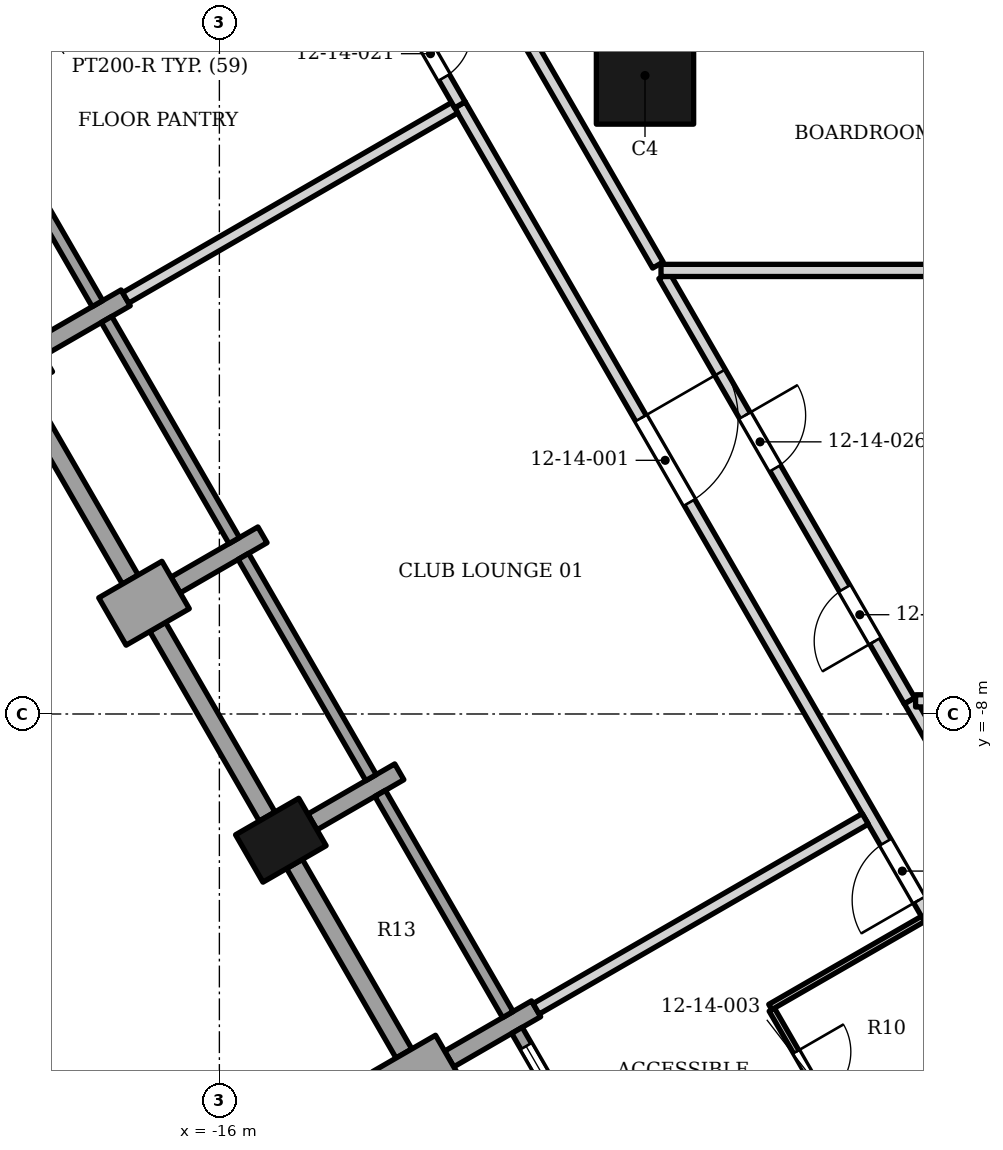
"""IFC4 building model, lengths in metres.
Left out: names, types, materials, properties, quantities, classifications, styles, units other than length and angle.
Written with IfcOpenShell. Run it as: python <this file> out.ifc"""

import sys

from ifc_helpers import new_model, si_unit, direction, frame, frame_2d, origin, origin_2d, place, context, subcontext, project, spatial, rectangle, extrude, element, fill, save


model = new_model("IFC4")
c1 = context("Model", 3, precision=1e-05, world=origin(), true_north=direction((0.0, 1.0)))
c2 = subcontext(c1, "Body", "Model", "MODEL_VIEW")
j1 = project(units=[si_unit("LENGTHUNIT", "METRE"), si_unit("PLANEANGLEUNIT", "RADIAN")], contexts=[c1])
p1 = place(None, origin())
s1 = spatial("IfcSite", under=j1, at=p1, CompositionType="ELEMENT")
p2 = place(p1, origin())
s2 = spatial("IfcBuilding", under=s1, at=p2, CompositionType="ELEMENT")
p3 = place(p2, frame((0.0, 0.0, 66.4)))
s3 = spatial("IfcBuildingStorey", under=s2, at=p3, CompositionType="ELEMENT", Elevation=66.4)
p4 = place(p3, frame((-9.0, 2.5, 0.0), z_axis=(0.0, 0.0, 1.0), x_axis=(1.0, 0.0, 0.0)))
e1 = element("IfcColumn", 1, at=p4, inside=s3, PredefinedType="COLUMN", context=c2, shape_type="SweptSolid", body=[
    extrude(rectangle(XDim=1.6, YDim=1.6, at=origin_2d()), origin(), (0.0, 0.0, 1.0), 3.4),
])
for number, where, z_axis, x_axis in (
    (2, (-19.489, -2.282, 0.0), (0.0, 0.0, 1.0), (0.5, -0.866, 0.0)),
    (3, (-14.989, -10.076, 0.0), (0.0, 0.0, 1.0), (0.5, -0.866, 0.0)),
):
    element("IfcColumn", number, at=place(p3, frame(where, z_axis=z_axis, x_axis=x_axis)), inside=s3, PredefinedType="COLUMN", context=c2, shape_type="SweptSolid", body=[
        extrude(rectangle(XDim=0.9, YDim=1.2, at=origin_2d()), origin(), (0.0, 0.0, 1.0), 3.4),
    ])
p5 = place(p3, frame((-17.541, -1.157, 0.0), z_axis=(0.0, 0.0, 1.0), x_axis=(-0.866104278045, -0.499863360881, 0.0)))
e4 = element("IfcWall", 4, at=p5, inside=s3, PredefinedType="SOLIDWALL", context=c2, shape_type="SweptSolid", body=[
    extrude(rectangle(XDim=1.65, YDim=0.3, at=frame_2d((0.825, 0.0))), origin(), (0.0, 0.0, 1.0), 2.65),
])
p6 = place(p3, frame((-17.759, -6.479, 0.0), z_axis=(0.0, 0.0, 1.0), x_axis=(0.866006032174, 0.500033551112, 0.0)))
e5 = element("IfcWall", 5, at=p6, inside=s3, PredefinedType="SOLIDWALL", context=c2, shape_type="SweptSolid", body=[
    extrude(rectangle(XDim=1.2, YDim=0.9, at=frame_2d((0.6, 0.0))), origin(), (0.0, 0.0, 1.0), 2.63),
])
p7 = place(p3, frame((-15.291, -5.054, 0.0), z_axis=(0.0, 0.0, 1.0), x_axis=(-0.866040211805, -0.499974350878, 0.0)))
e6 = element("IfcWall", 6, at=p7, inside=s3, PredefinedType="SOLIDWALL", context=c2, shape_type="SweptSolid", body=[
    extrude(rectangle(XDim=1.65, YDim=0.3, at=frame_2d((0.825, 0.0))), origin(), (0.0, 0.0, 1.0), 2.65),
])
p8 = place(p3, frame((-14.469, -9.776, 0.0), z_axis=(0.0, 0.0, 1.0), x_axis=(0.866067297121, 0.499927431592, 0.0)))
e7 = element("IfcWall", 7, at=p8, inside=s3, PredefinedType="SOLIDWALL", context=c2, shape_type="SweptSolid", body=[
    extrude(rectangle(XDim=1.65, YDim=0.3, at=frame_2d((0.825, 0.0))), origin(), (0.0, 0.0, 1.0), 2.384),
])
p9 = place(p3, frame((-13.259, -14.273, 0.0), z_axis=(0.0, 0.0, 1.0), x_axis=(0.866006032174, 0.500033551112, 0.0)))
e8 = element("IfcWall", 8, at=p9, inside=s3, PredefinedType="SOLIDWALL", context=c2, shape_type="SweptSolid", body=[
    extrude(rectangle(XDim=1.2, YDim=0.9, at=frame_2d((0.6, 0.0))), origin(), (0.0, 0.0, 1.0), 2.63),
])
p10 = place(p3, frame((-12.22, -13.673, 0.0), z_axis=(0.0, 0.0, 1.0), x_axis=(0.866040211805, 0.499974350878, 0.0)))
e9 = element("IfcWall", 9, at=p10, inside=s3, PredefinedType="SOLIDWALL", context=c2, shape_type="SweptSolid", body=[
    extrude(rectangle(XDim=1.65, YDim=0.3, at=frame_2d((0.825, 0.0))), origin(), (0.0, 0.0, 1.0), 2.65),
])
p11 = place(p3, frame((-20.105, 2.385, 0.0), z_axis=(0.0, 0.0, 1.0), x_axis=(0.49998411664, -0.866034573852, 0.0)))
e10 = element("IfcWall", 10, at=p11, inside=s3, PredefinedType="ELEMENTEDWALL", context=c2, shape_type="SweptSolid", body=[
    extrude(rectangle(XDim=4.2, YDim=0.2, at=frame_2d((2.1, 0.0))), origin(), (0.0, 0.0, 1.0), 2.65),
])
p12 = place(p3, frame((-17.464, -5.789, 0.0), z_axis=(0.0, 0.0, 1.0), x_axis=(-0.50001992892, 0.866013897511, 0.0)))
e11 = element("IfcWall", 11, at=p12, inside=s3, PredefinedType="SOLIDWALL", context=c2, shape_type="SweptSolid", body=[
    extrude(rectangle(XDim=3.599, YDim=0.3, at=frame_2d((1.8, 0.0))), origin(), (0.0, 0.0, 1.0), 2.63),
])
p13 = place(p3, frame((-17.855, -1.511, 0.0), z_axis=(0.0, 0.0, 1.0), x_axis=(0.499958946799, -0.866049104564, 0.0)))
e12 = element("IfcWall", 12, at=p13, inside=s3, PredefinedType="ELEMENTEDWALL", context=c2, shape_type="SweptSolid", body=[
    extrude(rectangle(XDim=4.2, YDim=0.2, at=frame_2d((2.1, 0.0))), origin(), (0.0, 0.0, 1.0), 2.65),
])
p14 = place(p3, frame((-17.014, -6.568, 0.0), z_axis=(0.0, 0.0, 1.0), x_axis=(0.500012057535, -0.866018442252, 0.0)))
e13 = element("IfcWall", 13, at=p14, inside=s3, PredefinedType="SOLIDWALL", context=c2, shape_type="SweptSolid", body=[
    extrude(rectangle(XDim=3.6, YDim=0.3, at=frame_2d((1.8, 0.0))), origin(), (0.0, 0.0, 1.0), 2.63),
])
p15 = place(p3, frame((-15.605, -5.409, 0.0), z_axis=(0.0, 0.0, 1.0), x_axis=(0.49998411664, -0.866034573852, 0.0)))
e14 = element("IfcWall", 14, at=p15, inside=s3, PredefinedType="ELEMENTEDWALL", context=c2, shape_type="SweptSolid", body=[
    extrude(rectangle(XDim=4.2, YDim=0.2, at=frame_2d((2.1, 0.0))), origin(), (0.0, 0.0, 1.0), 2.384),
])
p16 = place(p3, frame((-12.964, -13.583, 0.0), z_axis=(0.0, 0.0, 1.0), x_axis=(-0.499990559667, 0.866030854095, 0.0)))
e15 = element("IfcWall", 15, at=p16, inside=s3, PredefinedType="SOLIDWALL", context=c2, shape_type="SweptSolid", body=[
    extrude(rectangle(XDim=3.6, YDim=0.3, at=frame_2d((1.8, 0.0))), origin(), (0.0, 0.0, 1.0), 2.374),
])
p17 = place(p3, frame((-13.355, -9.306, 0.0), z_axis=(0.0, 0.0, 1.0), x_axis=(0.499958946799, -0.866049104564, 0.0)))
e16 = element("IfcWall", 16, at=p17, inside=s3, PredefinedType="ELEMENTEDWALL", context=c2, shape_type="SweptSolid", body=[
    extrude(rectangle(XDim=4.2, YDim=0.2, at=frame_2d((2.1, 0.0))), origin(), (0.0, 0.0, 1.0), 2.374),
])
p18 = place(p3, frame((-11.105, -13.203, 0.0), z_axis=(0.0, 0.0, 1.0), x_axis=(0.49998411664, -0.866034573852, 0.0)))
e17 = element("IfcWall", 17, at=p18, inside=s3, PredefinedType="ELEMENTEDWALL", context=c2, shape_type="SweptSolid", body=[
    extrude(rectangle(XDim=4.2, YDim=0.2, at=frame_2d((2.1, 0.0))), origin(), (0.0, 0.0, 1.0), 2.65),
])
p19 = place(p18, frame((0.3, 0.0, 0.6)))
e18 = element("IfcOpeningElement", 18, at=p19, cuts=e17, PredefinedType="OPENING", context=c2, shape_type="SweptSolid", body=[
    extrude(rectangle(XDim=2.1, YDim=1.8, at=frame_2d((1.05, 0.9))), frame((0.0, 0.11, 0.0), z_axis=(0.0, -1.0, 0.0), x_axis=(1.0, 0.0, 0.0)), (0.0, 0.0, 1.0), 0.22),
])
p20 = place(p18, frame((2.7, 0.0, 0.0)))
e19 = element("IfcOpeningElement", 19, at=p20, cuts=e17, PredefinedType="OPENING", context=c2, shape_type="SweptSolid", body=[
    extrude(rectangle(XDim=1.2, YDim=2.4, at=frame_2d((0.6, 1.2))), frame((0.0, 0.11, 0.0), z_axis=(0.0, -1.0, 0.0), x_axis=(1.0, 0.0, 0.0)), (0.0, 0.0, 1.0), 0.22),
])
p21 = place(p3, frame((-4.687, -14.52, 0.0), z_axis=(0.0, 0.0, 1.0), x_axis=(0.866533485277, 0.499118942632, 0.0)))
e20 = element("IfcWall", 20, at=p21, inside=s3, PredefinedType="PARTITIONING", context=c2, shape_type="SweptSolid", body=[
    extrude(rectangle(XDim=1.798, YDim=0.2, at=frame_2d((0.899, 0.0))), origin(), (0.0, 0.0, 1.0), 2.552),
])
p22 = place(p3, frame((-12.043, 2.017, 0.0), z_axis=(0.0, 0.0, 1.0), x_axis=(0.5000018851, -0.866024315419, 0.0)))
e21 = element("IfcWall", 21, at=p22, inside=s3, PredefinedType="PARTITIONING", context=c2, shape_type="SweptSolid", body=[
    extrude(rectangle(XDim=18.0, YDim=0.2, at=frame_2d((9.0, 0.0))), origin(), (0.0, 0.0, 1.0), 2.374),
])
p23 = place(p22, frame((5.95, 0.0, 0.0)))
e22 = element("IfcOpeningElement", 22, at=p23, cuts=e21, PredefinedType="OPENING", context=c2, shape_type="SweptSolid", body=[
    extrude(rectangle(XDim=1.6, YDim=2.1, at=frame_2d((0.8, 1.05))), frame((0.0, 0.11, 0.0), z_axis=(0.0, -1.0, 0.0), x_axis=(1.0, 0.0, 0.0)), (0.0, 0.0, 1.0), 0.22),
])
p24 = place(p22, frame((14.0, 0.0, 0.0)))
e23 = element("IfcOpeningElement", 23, at=p24, cuts=e21, PredefinedType="OPENING", context=c2, shape_type="SweptSolid", body=[
    extrude(rectangle(XDim=1.1, YDim=2.1, at=frame_2d((0.55, 1.05))), frame((0.0, 0.11, 0.0), z_axis=(0.0, -1.0, 0.0), x_axis=(1.0, 0.0, 0.0)), (0.0, 0.0, 1.0), 0.22),
])
p25 = place(p3, frame((-6.915, -12.862, 0.0), z_axis=(0.0, 0.0, 1.0), x_axis=(0.500062241894, -0.865989465428, 0.0)))
e24 = element("IfcWall", 24, at=p25, inside=s3, PredefinedType="PARTITIONING", context=c2, shape_type="SweptSolid", body=[
    extrude(rectangle(XDim=2.55, YDim=0.1, at=frame_2d((1.275, 0.0))), origin(), (0.0, 0.0, 1.0), 3.23),
])
p26 = place(p25, frame((0.8, 0.0, 0.0)))
e25 = element("IfcOpeningElement", 25, at=p26, cuts=e24, PredefinedType="OPENING", context=c2, shape_type="SweptSolid", body=[
    extrude(rectangle(XDim=0.9, YDim=2.1, at=frame_2d((0.45, 1.05))), frame((0.0, 0.06, 0.0), z_axis=(0.0, -1.0, 0.0), x_axis=(1.0, 0.0, 0.0)), (0.0, 0.0, 1.0), 0.12),
])
p27 = place(p3, frame((-6.94, -12.818, 0.0), z_axis=(0.0, 0.0, 1.0), x_axis=(0.866314505181, 0.49949892704, 0.0)))
e26 = element("IfcWall", 26, at=p27, inside=s3, PredefinedType="PARTITIONING", context=c2, shape_type="SweptSolid", body=[
    extrude(rectangle(XDim=2.9, YDim=0.1, at=frame_2d((1.45, 0.0))), origin(), (0.0, 0.0, 1.0), 2.374),
])
p28 = place(p3, frame((-10.791, -12.848, 0.0), z_axis=(0.0, 0.0, 1.0), x_axis=(0.866170627668, 0.499748380452, 0.0)))
e27 = element("IfcWall", 27, at=p28, inside=s3, PredefinedType="PARTITIONING", context=c2, shape_type="SweptSolid", body=[
    extrude(rectangle(XDim=6.25, YDim=0.2, at=frame_2d((3.125, 0.0))), origin(), (0.0, 0.0, 1.0), 2.374),
])
p29 = place(p3, frame((-4.649, -7.782, 0.0), z_axis=(0.0, 0.0, 1.0), x_axis=(0.500018878653, -0.866014503915, 0.0)))
e28 = element("IfcWall", 28, at=p29, inside=s3, PredefinedType="PARTITIONING", context=c2, shape_type="SweptSolid", body=[
    extrude(rectangle(XDim=9.34, YDim=0.2, at=frame_2d((4.67, 0.0))), origin(), (0.0, 0.0, 1.0), 2.374),
])
p30 = place(p29, frame((2.488, 0.0, 0.0)))
e29 = element("IfcOpeningElement", 29, at=p30, cuts=e28, PredefinedType="OPENING", context=c2, shape_type="SweptSolid", body=[
    extrude(rectangle(XDim=1.0, YDim=2.1, at=frame_2d((0.5, 1.05))), frame((0.0, 0.11, 0.0), z_axis=(0.0, -1.0, 0.0), x_axis=(1.0, 0.0, 0.0)), (0.0, 0.0, 1.0), 0.22),
])
p31 = place(p3, frame((-4.55, -7.784, 0.0), z_axis=(0.0, 0.0, 1.0), x_axis=(1.0, 0.0, 0.0)))
e30 = element("IfcWall", 30, at=p31, inside=s3, PredefinedType="PARTITIONING", context=c2, shape_type="SweptSolid", body=[
    extrude(rectangle(XDim=9.138, YDim=0.2, at=frame_2d((4.569, 0.0))), origin(), (0.0, 0.0, 1.0), 2.384),
])
p32 = place(p3, frame((-17.541, -1.156, 0.0), z_axis=(0.0, 0.0, 1.0), x_axis=(0.865906436394, 0.500206000974, 0.0)))
e31 = element("IfcWall", 31, at=p32, inside=s3, PredefinedType="PARTITIONING", context=c2, shape_type="SweptSolid", body=[
    extrude(rectangle(XDim=6.249, YDim=0.2, at=frame_2d((3.125, 0.0))), origin(), (0.0, 0.0, 1.0), 2.384),
])
p33 = place(p3, frame((-8.686, -0.79, 0.0), z_axis=(0.0, 0.0, 1.0), x_axis=(0.499814962183, -0.866132209064, 0.0)))
e32 = element("IfcWall", 32, at=p33, inside=s3, PredefinedType="PARTITIONING", context=c2, shape_type="SweptSolid", body=[
    extrude(rectangle(XDim=8.072, YDim=0.2, at=frame_2d((4.036, 0.0))), origin(), (0.0, 0.0, 1.0), 2.384),
])
p34 = place(p33, frame((5.939, 0.0, 0.0)))
e33 = element("IfcOpeningElement", 33, at=p34, cuts=e32, PredefinedType="OPENING", context=c2, shape_type="SweptSolid", body=[
    extrude(rectangle(XDim=1.0, YDim=2.1, at=frame_2d((0.5, 1.05))), frame((0.0, 0.11, 0.0), z_axis=(0.0, -1.0, 0.0), x_axis=(1.0, 0.0, 0.0)), (0.0, 0.0, 1.0), 0.22),
])
p35 = place(p33, frame((2.657, 0.0, 0.0)))
e34 = element("IfcOpeningElement", 34, at=p35, cuts=e32, PredefinedType="OPENING", context=c2, shape_type="SweptSolid", body=[
    extrude(rectangle(XDim=1.0, YDim=2.1, at=frame_2d((0.5, 1.05))), frame((0.0, 0.11, 0.0), z_axis=(0.0, -1.0, 0.0), x_axis=(1.0, 0.0, 0.0)), (0.0, 0.0, 1.0), 0.22),
])
p36 = place(p3, frame((-8.737, -0.706, 0.0), z_axis=(0.0, 0.0, 1.0), x_axis=(1.0, 0.0, 0.0)))
e35 = element("IfcWall", 35, at=p36, inside=s3, PredefinedType="PARTITIONING", context=c2, shape_type="SweptSolid", body=[
    extrude(rectangle(XDim=17.512, YDim=0.2, at=frame_2d((8.756, 0.0))), origin(), (0.0, 0.0, 1.0), 2.384),
])
p37 = place(p3, frame((-13.013, 3.699, 0.0), z_axis=(0.0, 0.0, 1.0), x_axis=(0.499265012286, -0.866449333491, 0.0)))
e36 = element("IfcWall", 36, at=p37, inside=s3, PredefinedType="PARTITIONING", context=c2, shape_type="SweptSolid", body=[
    extrude(rectangle(XDim=1.941, YDim=0.2, at=frame_2d((0.97, 0.0))), origin(), (0.0, 0.0, 1.0), 3.23),
])
p38 = place(p37, frame((0.521, 0.0, 0.0)))
e37 = element("IfcOpeningElement", 37, at=p38, cuts=e36, PredefinedType="OPENING", context=c2, shape_type="SweptSolid", body=[
    extrude(rectangle(XDim=0.9, YDim=2.1, at=frame_2d((0.45, 1.05))), frame((0.0, 0.11, 0.0), z_axis=(0.0, -1.0, 0.0), x_axis=(1.0, 0.0, 0.0)), (0.0, 0.0, 1.0), 0.22),
])
p39 = place(p3, frame((-11.23, 3.613, 0.0), z_axis=(0.0, 0.0, 1.0), x_axis=(0.49997195544, -0.866041594713, 0.0)))
e38 = element("IfcWall", 38, at=p39, inside=s3, PredefinedType="PARTITIONING", context=c2, shape_type="SweptSolid", body=[
    extrude(rectangle(XDim=4.885, YDim=0.2, at=frame_2d((2.442, 0.0))), origin(), (0.0, 0.0, 1.0), 2.552),
])
p40 = place(p3, frame((-19.791, 2.74, 0.0), z_axis=(0.0, 0.0, 1.0), x_axis=(0.86605932655, 0.499941239442, 0.0)))
e39 = element("IfcWall", 39, at=p40, inside=s3, PredefinedType="PARTITIONING", context=c2, shape_type="SweptSolid", body=[
    extrude(rectangle(XDim=2.479, YDim=0.2, at=frame_2d((1.24, 0.0))), origin(), (0.0, 0.0, 1.0), 2.702),
])
p41 = place(p19, origin())
e40 = element("IfcWindow", 40, at=p41, inside=s3, PartitioningType="SINGLE_PANEL", PredefinedType="WINDOW", context=c2, shape_type="SweptSolid", body=[
    extrude(rectangle(XDim=2.1, YDim=1.8, at=frame_2d((1.05, 0.9))), frame((0.0, 0.03, 0.0), z_axis=(0.0, -1.0, 0.0), x_axis=(1.0, 0.0, 0.0)), (0.0, 0.0, 1.0), 0.06),
])
fill(e18, e40)
p42 = place(p23, origin())
e41 = element("IfcDoor", 41, at=p42, inside=s3, OperationType="DOUBLE_DOOR_SINGLE_SWING", PredefinedType="DOOR", context=c2, shape_type="SweptSolid", body=[
    extrude(rectangle(XDim=1.6, YDim=2.1, at=frame_2d((0.8, 1.05))), frame((0.0, 0.025, 0.0), z_axis=(0.0, -1.0, 0.0), x_axis=(1.0, 0.0, 0.0)), (0.0, 0.0, 1.0), 0.05),
])
fill(e22, e41)
p43 = place(p24, origin())
e42 = element("IfcDoor", 42, at=p43, inside=s3, OperationType="SINGLE_SWING_RIGHT", PredefinedType="DOOR", context=c2, shape_type="SweptSolid", body=[
    extrude(rectangle(XDim=1.1, YDim=2.1, at=frame_2d((0.55, 1.05))), frame((0.0, 0.025, 0.0), z_axis=(0.0, -1.0, 0.0), x_axis=(1.0, 0.0, 0.0)), (0.0, 0.0, 1.0), 0.05),
])
fill(e23, e42)
p44 = place(p26, origin())
e43 = element("IfcDoor", 43, at=p44, inside=s3, OperationType="SINGLE_SWING_LEFT", PredefinedType="DOOR", context=c2, shape_type="SweptSolid", body=[
    extrude(rectangle(XDim=0.9, YDim=2.1, at=frame_2d((0.45, 1.05))), frame((0.0, 0.025, 0.0), z_axis=(0.0, -1.0, 0.0), x_axis=(1.0, 0.0, 0.0)), (0.0, 0.0, 1.0), 0.05),
])
fill(e25, e43)
p45 = place(p34, origin())
e44 = element("IfcDoor", 44, at=p45, inside=s3, OperationType="SINGLE_SWING_RIGHT", PredefinedType="DOOR", context=c2, shape_type="SweptSolid", body=[
    extrude(rectangle(XDim=1.0, YDim=2.1, at=frame_2d((0.5, 1.05))), frame((0.0, 0.025, 0.0), z_axis=(0.0, -1.0, 0.0), x_axis=(1.0, 0.0, 0.0)), (0.0, 0.0, 1.0), 0.05),
])
fill(e33, e44)
p46 = place(p38, origin())
e45 = element("IfcDoor", 45, at=p46, inside=s3, OperationType="SINGLE_SWING_LEFT", PredefinedType="DOOR", context=c2, shape_type="SweptSolid", body=[
    extrude(rectangle(XDim=0.9, YDim=2.1, at=frame_2d((0.45, 1.05))), frame((0.0, 0.025, 0.0), z_axis=(0.0, -1.0, 0.0), x_axis=(1.0, 0.0, 0.0)), (0.0, 0.0, 1.0), 0.05),
])
fill(e37, e45)
p47 = place(p35, origin())
e46 = element("IfcDoor", 46, at=p47, inside=s3, OperationType="SINGLE_SWING_LEFT", PredefinedType="DOOR", context=c2, shape_type="SweptSolid", body=[
    extrude(rectangle(XDim=1.0, YDim=2.1, at=frame_2d((0.5, 1.05))), frame((0.0, 0.025, 0.0), z_axis=(0.0, -1.0, 0.0), x_axis=(1.0, 0.0, 0.0)), (0.0, 0.0, 1.0), 0.05),
])
fill(e34, e46)
save(model, sys.argv[1])
